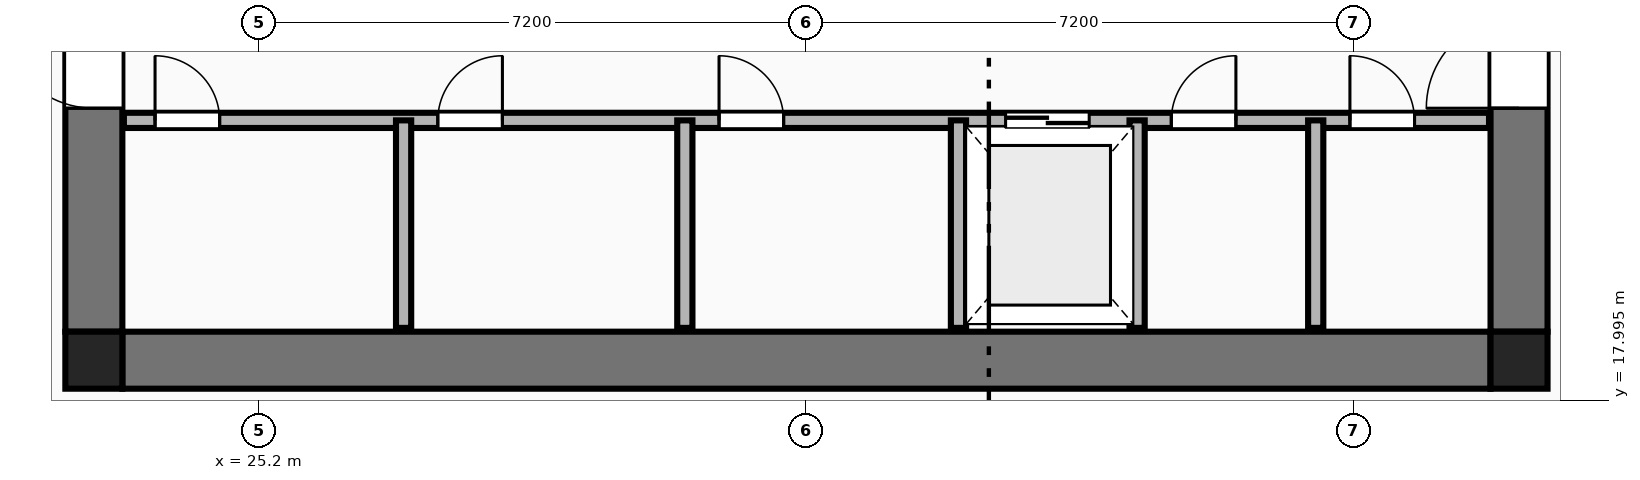
"""IFC4 building model, lengths in metres.
Left out: names, types, materials, properties, quantities, classifications, styles, units other than length and angle.
Written with IfcOpenShell. Run it as: python <this file> out.ifc"""

import sys

from ifc_helpers import new_model, si_unit, direction, frame, frame_2d, origin, origin_2d, place, context, subcontext, project, spatial, rectangle, extrude, element, fill, save


model = new_model("IFC4")
c1 = context("Model", 3, precision=1e-05, world=origin(), true_north=direction((0.0, 1.0)))
c2 = subcontext(c1, "Body", "Model", "MODEL_VIEW")
j1 = project(units=[si_unit("LENGTHUNIT", "METRE"), si_unit("PLANEANGLEUNIT", "RADIAN")], contexts=[c1])
p1 = place(None, origin())
s1 = spatial("IfcSite", under=j1, at=p1, CompositionType="ELEMENT")
p2 = place(p1, origin())
s2 = spatial("IfcBuilding", under=s1, at=p2, CompositionType="ELEMENT")
p3 = place(p2, frame((0.0, 0.0, 130.35)))
s3 = spatial("IfcBuildingStorey", under=s2, at=p3, CompositionType="ELEMENT", Elevation=130.35)
for number, where, z_axis, x_axis in (
    (1, (23.025, 18.525, 0.0), (0.0, 0.0, 1.0), (1.0, 0.0, 0.0)),
    (2, (41.775, 18.525, 0.0), (0.0, 0.0, 1.0), (1.0, 0.0, 0.0)),
):
    element("IfcColumn", number, at=place(p3, frame(where, z_axis=z_axis, x_axis=x_axis)), inside=s3, PredefinedType="COLUMN", context=c2, shape_type="SweptSolid", body=[
        extrude(rectangle(XDim=0.75, YDim=0.75, at=origin_2d()), origin(), (0.0, 0.0, 1.0), 3.55),
    ])
p4 = place(p3, frame((23.4, 18.525, 0.0), z_axis=(0.0, 0.0, 1.0), x_axis=(1.0, 0.0, 0.0)))
e3 = element("IfcWall", 3, at=p4, inside=s3, PredefinedType="SHEAR", context=c2, shape_type="SweptSolid", body=[
    extrude(rectangle(XDim=18.0, YDim=0.75, at=frame_2d((9.0, 0.0))), origin(), (0.0, 0.0, 1.0), 3.34),
])
p5 = place(p3, frame((23.025, 18.9, 0.0), z_axis=(0.0, 0.0, 1.0), x_axis=(0.0, 1.0, 0.0)))
e4 = element("IfcWall", 4, at=p5, inside=s3, PredefinedType="SHEAR", context=c2, shape_type="SweptSolid", body=[
    extrude(rectangle(XDim=14.0, YDim=0.75, at=frame_2d((7.0, 0.0))), origin(), (0.0, 0.0, 1.0), 3.34),
])
p6 = place(p5, frame((2.94, 0.0, 0.0)))
e5 = element("IfcOpeningElement", 5, at=p6, cuts=e4, PredefinedType="OPENING", context=c2, shape_type="SweptSolid", body=[
    extrude(rectangle(XDim=1.22, YDim=2.25, at=frame_2d((0.61, 1.125))), frame((0.0, 0.385, 0.0), z_axis=(0.0, -1.0, 0.0), x_axis=(1.0, 0.0, 0.0)), (0.0, 0.0, 1.0), 0.77),
])
p7 = place(p3, frame((41.775, 18.9, 0.0), z_axis=(0.0, 0.0, 1.0), x_axis=(0.0, 1.0, 0.0)))
e6 = element("IfcWall", 6, at=p7, inside=s3, PredefinedType="SHEAR", context=c2, shape_type="SweptSolid", body=[
    extrude(rectangle(XDim=14.0, YDim=0.75, at=frame_2d((7.0, 0.0))), origin(), (0.0, 0.0, 1.0), 3.34),
])
p8 = place(p7, frame((2.94, 0.0, 0.0)))
e7 = element("IfcOpeningElement", 7, at=p8, cuts=e6, PredefinedType="OPENING", context=c2, shape_type="SweptSolid", body=[
    extrude(rectangle(XDim=1.22, YDim=2.25, at=frame_2d((0.61, 1.125))), frame((0.0, 0.385, 0.0), z_axis=(0.0, -1.0, 0.0), x_axis=(1.0, 0.0, 0.0)), (0.0, 0.0, 1.0), 0.77),
])
p9 = place(p3, frame((23.42, 21.68, 0.0), z_axis=(0.0, 0.0, 1.0), x_axis=(1.0, 0.0, 0.0)))
e8 = element("IfcWall", 8, at=p9, inside=s3, PredefinedType="PLUMBINGWALL", context=c2, shape_type="SweptSolid", body=[
    extrude(rectangle(XDim=17.96, YDim=0.2, at=frame_2d((8.98, 0.0))), origin(), (0.0, 0.0, 1.0), 3.34),
])
p10 = place(p9, frame((11.6, 0.0, 0.0)))
e9 = element("IfcOpeningElement", 9, at=p10, cuts=e8, PredefinedType="OPENING", context=c2, shape_type="SweptSolid", body=[
    extrude(rectangle(XDim=1.1, YDim=2.2, at=frame_2d((0.55, 1.1))), frame((0.0, 0.11, 0.0), z_axis=(0.0, -1.0, 0.0), x_axis=(1.0, 0.0, 0.0)), (0.0, 0.0, 1.0), 0.22),
])
p11 = place(p9, frame((0.41, 0.0, 0.0)))
e10 = element("IfcOpeningElement", 10, at=p11, cuts=e8, PredefinedType="OPENING", context=c2, shape_type="SweptSolid", body=[
    extrude(rectangle(XDim=0.85, YDim=2.05, at=frame_2d((0.425, 1.025))), frame((0.0, 0.11, 0.0), z_axis=(0.0, -1.0, 0.0), x_axis=(1.0, 0.0, 0.0)), (0.0, 0.0, 1.0), 0.22),
])
p12 = place(p9, frame((4.13, 0.0, 0.0)))
e11 = element("IfcOpeningElement", 11, at=p12, cuts=e8, PredefinedType="OPENING", context=c2, shape_type="SweptSolid", body=[
    extrude(rectangle(XDim=0.85, YDim=2.05, at=frame_2d((0.425, 1.025))), frame((0.0, 0.11, 0.0), z_axis=(0.0, -1.0, 0.0), x_axis=(1.0, 0.0, 0.0)), (0.0, 0.0, 1.0), 0.22),
])
p13 = place(p9, frame((7.83, 0.0, 0.0)))
e12 = element("IfcOpeningElement", 12, at=p13, cuts=e8, PredefinedType="OPENING", context=c2, shape_type="SweptSolid", body=[
    extrude(rectangle(XDim=0.85, YDim=2.05, at=frame_2d((0.425, 1.025))), frame((0.0, 0.11, 0.0), z_axis=(0.0, -1.0, 0.0), x_axis=(1.0, 0.0, 0.0)), (0.0, 0.0, 1.0), 0.22),
])
p14 = place(p9, frame((13.78, 0.0, 0.0)))
e13 = element("IfcOpeningElement", 13, at=p14, cuts=e8, PredefinedType="OPENING", context=c2, shape_type="SweptSolid", body=[
    extrude(rectangle(XDim=0.85, YDim=2.05, at=frame_2d((0.425, 1.025))), frame((0.0, 0.11, 0.0), z_axis=(0.0, -1.0, 0.0), x_axis=(1.0, 0.0, 0.0)), (0.0, 0.0, 1.0), 0.22),
])
p15 = place(p9, frame((16.13, 0.0, 0.0)))
e14 = element("IfcOpeningElement", 14, at=p15, cuts=e8, PredefinedType="OPENING", context=c2, shape_type="SweptSolid", body=[
    extrude(rectangle(XDim=0.85, YDim=2.05, at=frame_2d((0.425, 1.025))), frame((0.0, 0.11, 0.0), z_axis=(0.0, -1.0, 0.0), x_axis=(1.0, 0.0, 0.0)), (0.0, 0.0, 1.0), 0.22),
])
for number, where, z_axis, x_axis in (
    (15, (34.4, 18.95, 0.0), (0.0, 0.0, 1.0), (0.0, 1.0, 0.0)),
    (16, (36.75, 18.95, 0.0), (0.0, 0.0, 1.0), (0.0, 1.0, 0.0)),
    (17, (27.1, 18.95, 0.0), (0.0, 0.0, 1.0), (0.0, 1.0, 0.0)),
    (18, (30.8, 18.95, 0.0), (0.0, 0.0, 1.0), (0.0, 1.0, 0.0)),
    (19, (39.1, 18.95, 0.0), (0.0, 0.0, 1.0), (0.0, 1.0, 0.0)),
):
    element("IfcWall", number, at=place(p3, frame(where, z_axis=z_axis, x_axis=x_axis)), inside=s3, PredefinedType="PLUMBINGWALL", context=c2, shape_type="SweptSolid", body=[
        extrude(rectangle(XDim=2.73, YDim=0.2, at=frame_2d((1.365, 0.0))), origin(), (0.0, 0.0, 1.0), 3.34),
    ])
p16 = place(p6, origin())
e20 = element("IfcDoor", 20, at=p16, inside=s3, OperationType="SINGLE_SWING_RIGHT", PredefinedType="DOOR", context=c2, shape_type="SweptSolid", body=[
    extrude(rectangle(XDim=1.22, YDim=2.25, at=frame_2d((0.61, 1.125))), frame((0.0, 0.025, 0.0), z_axis=(0.0, -1.0, 0.0), x_axis=(1.0, 0.0, 0.0)), (0.0, 0.0, 1.0), 0.05),
])
fill(e5, e20)
p17 = place(p8, origin())
e21 = element("IfcDoor", 21, at=p17, inside=s3, OperationType="SINGLE_SWING_LEFT", PredefinedType="DOOR", context=c2, shape_type="SweptSolid", body=[
    extrude(rectangle(XDim=1.22, YDim=2.25, at=frame_2d((0.61, 1.125))), frame((0.0, 0.025, 0.0), z_axis=(0.0, -1.0, 0.0), x_axis=(1.0, 0.0, 0.0)), (0.0, 0.0, 1.0), 0.05),
])
fill(e7, e21)
p18 = place(p10, origin())
e22 = element("IfcDoor", 22, at=p18, inside=s3, OperationType="DOUBLE_DOOR_SLIDING", PredefinedType="DOOR", context=c2, shape_type="SweptSolid", body=[
    extrude(rectangle(XDim=1.1, YDim=2.2, at=frame_2d((0.55, 1.1))), frame((0.0, 0.025, 0.0), z_axis=(0.0, -1.0, 0.0), x_axis=(1.0, 0.0, 0.0)), (0.0, 0.0, 1.0), 0.05),
])
fill(e9, e22)
p19 = place(p11, origin())
e23 = element("IfcDoor", 23, at=p19, inside=s3, OperationType="SINGLE_SWING_LEFT", PredefinedType="DOOR", context=c2, shape_type="SweptSolid", body=[
    extrude(rectangle(XDim=0.85, YDim=2.05, at=frame_2d((0.425, 1.025))), frame((0.0, 0.025, 0.0), z_axis=(0.0, -1.0, 0.0), x_axis=(1.0, 0.0, 0.0)), (0.0, 0.0, 1.0), 0.05),
])
fill(e10, e23)
p20 = place(p12, origin())
e24 = element("IfcDoor", 24, at=p20, inside=s3, OperationType="SINGLE_SWING_RIGHT", PredefinedType="DOOR", context=c2, shape_type="SweptSolid", body=[
    extrude(rectangle(XDim=0.85, YDim=2.05, at=frame_2d((0.425, 1.025))), frame((0.0, 0.025, 0.0), z_axis=(0.0, -1.0, 0.0), x_axis=(1.0, 0.0, 0.0)), (0.0, 0.0, 1.0), 0.05),
])
fill(e11, e24)
p21 = place(p13, origin())
e25 = element("IfcDoor", 25, at=p21, inside=s3, OperationType="SINGLE_SWING_LEFT", PredefinedType="DOOR", context=c2, shape_type="SweptSolid", body=[
    extrude(rectangle(XDim=0.85, YDim=2.05, at=frame_2d((0.425, 1.025))), frame((0.0, 0.025, 0.0), z_axis=(0.0, -1.0, 0.0), x_axis=(1.0, 0.0, 0.0)), (0.0, 0.0, 1.0), 0.05),
])
fill(e12, e25)
p22 = place(p14, origin())
e26 = element("IfcDoor", 26, at=p22, inside=s3, OperationType="SINGLE_SWING_RIGHT", PredefinedType="DOOR", context=c2, shape_type="SweptSolid", body=[
    extrude(rectangle(XDim=0.85, YDim=2.05, at=frame_2d((0.425, 1.025))), frame((0.0, 0.025, 0.0), z_axis=(0.0, -1.0, 0.0), x_axis=(1.0, 0.0, 0.0)), (0.0, 0.0, 1.0), 0.05),
])
fill(e13, e26)
p23 = place(p15, origin())
e27 = element("IfcDoor", 27, at=p23, inside=s3, OperationType="SINGLE_SWING_LEFT", PredefinedType="DOOR", context=c2, shape_type="SweptSolid", body=[
    extrude(rectangle(XDim=0.85, YDim=2.05, at=frame_2d((0.425, 1.025))), frame((0.0, 0.025, 0.0), z_axis=(0.0, -1.0, 0.0), x_axis=(1.0, 0.0, 0.0)), (0.0, 0.0, 1.0), 0.05),
])
fill(e14, e27)
save(model, sys.argv[1])
